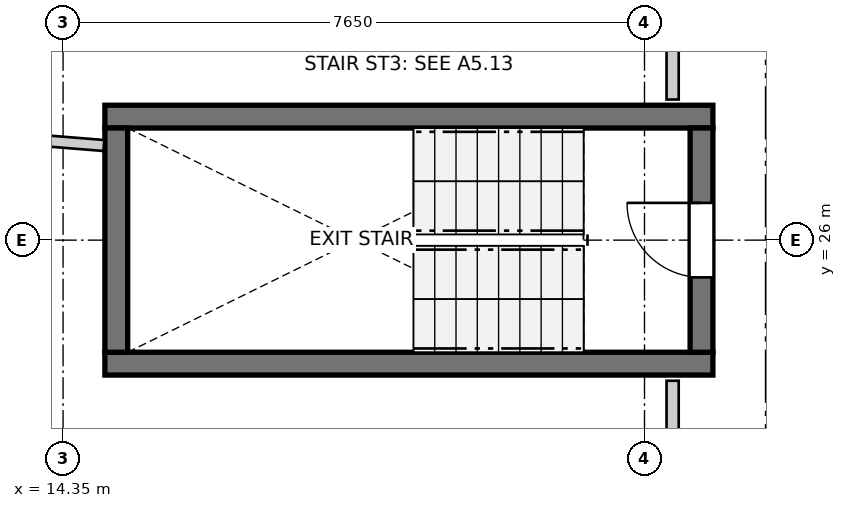
"""IFC4 building model, lengths in metres.
Left out: names, types, materials, properties, quantities, classifications, styles, units other than length and angle.
Written with IfcOpenShell. Run it as: python <this file> out.ifc"""

import sys

from ifc_helpers import new_model, si_unit, direction, frame, frame_2d, origin, place, context, subcontext, project, spatial, rectangle, extrude, source, transform, mapped, element, fill, save


model = new_model("IFC4")
c1 = context("Model", 3, precision=1e-05, world=origin(), true_north=direction((0.0, 1.0)))
c2 = subcontext(c1, "Body", "Model", "MODEL_VIEW")
j1 = project(units=[si_unit("LENGTHUNIT", "METRE"), si_unit("PLANEANGLEUNIT", "RADIAN")], contexts=[c1])
p1 = place(None, origin())
s1 = spatial("IfcSite", under=j1, at=p1, CompositionType="ELEMENT")
p2 = place(p1, origin())
s2 = spatial("IfcBuilding", under=s1, at=p2, CompositionType="ELEMENT")
p3 = place(p2, frame((0.0, 0.0, 161.8)))
s3 = spatial("IfcBuildingStorey", under=s2, at=p3, CompositionType="ELEMENT", Elevation=161.8)
for number, where, z_axis, x_axis in (
    (1, (14.9, 24.375, 0.0), (0.0, 0.0, 1.0), (1.0, 0.0, 0.0)),
    (2, (22.9, 27.625, 0.0), (0.0, 0.0, 1.0), (-1.0, 0.0, 0.0)),
):
    element("IfcWall", number, at=place(p3, frame(where, z_axis=z_axis, x_axis=x_axis)), inside=s3, PredefinedType="SHEAR", context=c2, shape_type="SweptSolid", body=[
        extrude(rectangle(XDim=8.0, YDim=0.3, at=frame_2d((4.0, 0.0))), origin(), (0.0, 0.0, 1.0), 2.95),
    ])
p4 = place(p3, frame((15.05, 27.475, 0.0), z_axis=(0.0, 0.0, 1.0), x_axis=(0.0, -1.0, 0.0)))
e3 = element("IfcWall", 3, at=p4, inside=s3, PredefinedType="SHEAR", context=c2, shape_type="SweptSolid", body=[
    extrude(rectangle(XDim=2.95, YDim=0.3, at=frame_2d((1.475, 0.0))), origin(), (0.0, 0.0, 1.0), 2.95),
])
p5 = place(p3, frame((22.75, 24.525, 0.0), z_axis=(0.0, 0.0, 1.0), x_axis=(0.0, 1.0, 0.0)))
e4 = element("IfcWall", 4, at=p5, inside=s3, PredefinedType="SHEAR", context=c2, shape_type="SweptSolid", body=[
    extrude(rectangle(XDim=2.95, YDim=0.3, at=frame_2d((1.475, 0.0))), origin(), (0.0, 0.0, 1.0), 2.95),
])
p6 = place(p5, frame((0.985, 0.0, 0.0)))
e5 = element("IfcOpeningElement", 5, at=p6, cuts=e4, PredefinedType="OPENING", context=c2, shape_type="SweptSolid", body=[
    extrude(rectangle(XDim=0.98, YDim=2.15, at=frame_2d((0.49, 1.075))), frame((0.0, 0.16, 0.0), z_axis=(0.0, -1.0, 0.0), x_axis=(1.0, 0.0, 0.0)), (0.0, 0.0, 1.0), 0.32),
])
p7 = place(p3, frame((22.37, 14.579, 0.0), z_axis=(0.0, 0.0, 1.0), x_axis=(0.0, 1.0, 0.0)))
e6 = element("IfcWall", 6, at=p7, inside=s3, PredefinedType="PARTITIONING", context=c2, shape_type="SweptSolid", body=[
    extrude(rectangle(XDim=9.571, YDim=0.16, at=frame_2d((4.785, 0.0))), origin(), (0.0, 0.0, 1.0), 2.95),
])
p8 = place(p7, frame((3.793, 0.0, 0.0)))
e7 = element("IfcOpeningElement", 7, at=p8, cuts=e6, PredefinedType="OPENING", context=c2, shape_type="SweptSolid", body=[
    extrude(rectangle(XDim=0.96, YDim=2.1, at=frame_2d((0.48, 1.05))), frame((0.0, 0.09, 0.0), z_axis=(0.0, -1.0, 0.0), x_axis=(1.0, 0.0, 0.0)), (0.0, 0.0, 1.0), 0.18),
])
p9 = place(p3, frame((22.37, 27.85, 0.0), z_axis=(0.0, 0.0, 1.0), x_axis=(0.0, 1.0, 0.0)))
e8 = element("IfcWall", 8, at=p9, inside=s3, PredefinedType="PARTITIONING", context=c2, shape_type="SweptSolid", body=[
    extrude(rectangle(XDim=4.759, YDim=0.16, at=frame_2d((2.379, 0.0))), origin(), (0.0, 0.0, 1.0), 2.95),
])
p10 = place(p9, frame((1.919, 0.0, 0.0)))
e9 = element("IfcOpeningElement", 9, at=p10, cuts=e8, PredefinedType="OPENING", context=c2, shape_type="SweptSolid", body=[
    extrude(rectangle(XDim=0.96, YDim=2.1, at=frame_2d((0.48, 1.05))), frame((0.0, 0.09, 0.0), z_axis=(0.0, -1.0, 0.0), x_axis=(1.0, 0.0, 0.0)), (0.0, 0.0, 1.0), 0.18),
])
p11 = place(p3, frame((8.015, 27.797, 0.0), z_axis=(0.0, 0.0, 1.0), x_axis=(0.996785477909, -0.080116858581, 0.0)))
e10 = element("IfcWall", 10, at=p11, inside=s3, PredefinedType="PARTITIONING", context=c2, shape_type="SweptSolid", body=[
    extrude(rectangle(XDim=6.893, YDim=0.145, at=frame_2d((3.447, 0.0))), origin(), (0.0, 0.0, 1.0), 2.95),
])
m1 = source(origin(), c2, "Body", "SweptSolid", [
    extrude(rectangle(XDim=0.98, YDim=2.15, at=frame_2d((0.49, 1.075))), frame((0.0, 0.025, 0.0), z_axis=(0.0, -1.0, 0.0), x_axis=(1.0, 0.0, 0.0)), (0.0, 0.0, 1.0), 0.05),
])
p12 = place(p6, origin())
e11 = element("IfcDoor", 11, at=p12, inside=s3, OperationType="SINGLE_SWING_RIGHT", PredefinedType="DOOR", context=c2, shape_type="MappedRepresentation", body=[
    mapped(m1, transform((0.0, 0.0, 0.0), x_axis=(1.0, 0.0, 0.0), y_axis=(0.0, 1.0, 0.0), z_axis=(0.0, 0.0, 1.0), scale=1.0)),
])
fill(e5, e11)
save(model, sys.argv[1])
